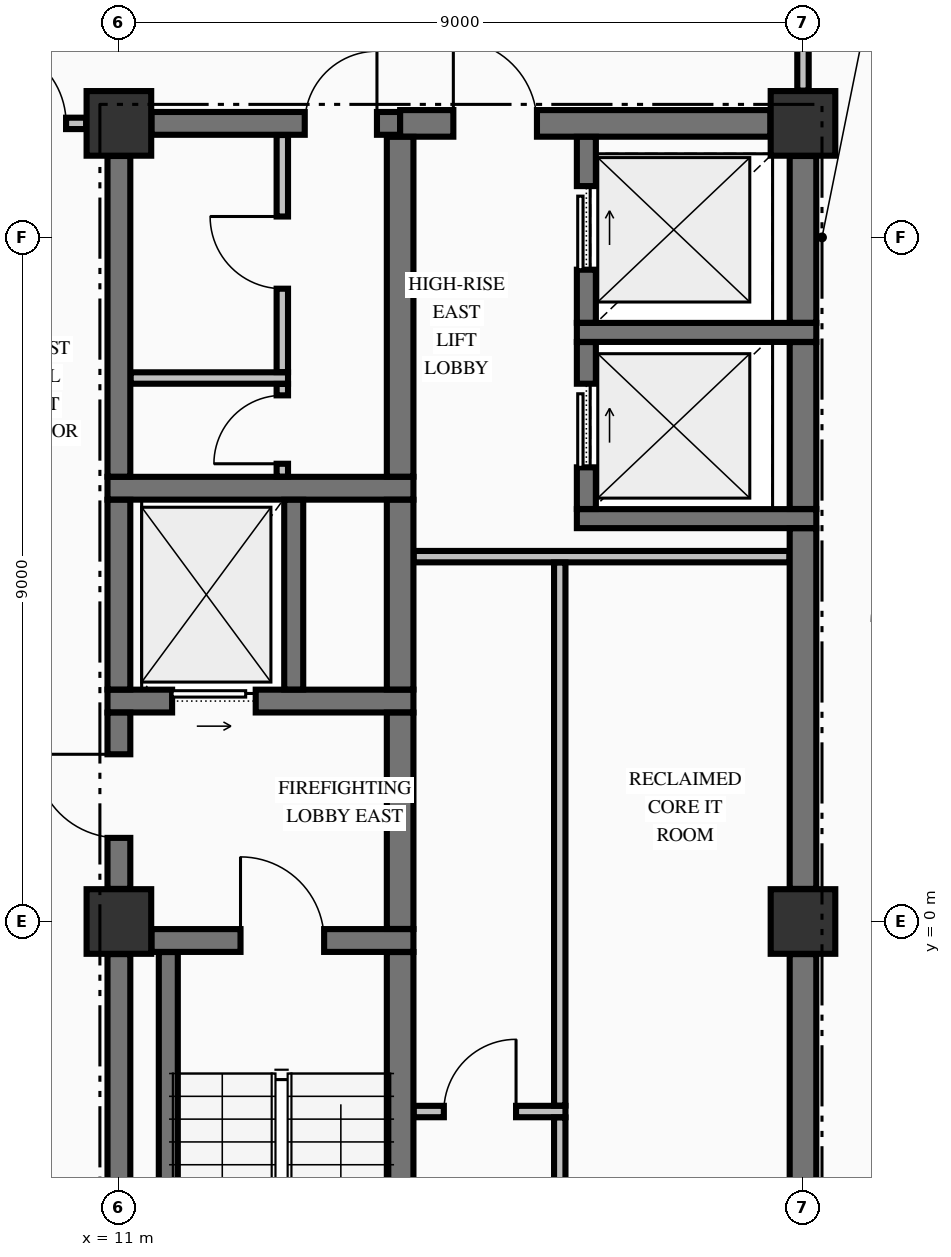
"""IFC4 building model, lengths in metres.
Left out: names, types, materials, properties, quantities, classifications, styles, units other than length and angle.
Written with IfcOpenShell. Run it as: python <this file> out.ifc"""

import sys

from ifc_helpers import new_model, si_unit, direction, frame, frame_2d, origin, origin_2d, place, context, subcontext, project, spatial, rectangle, extrude, element, fill, save


model = new_model("IFC4")
c1 = context("Model", 3, precision=1e-05, world=origin(), true_north=direction((0.0, 1.0)))
c2 = subcontext(c1, "Body", "Model", "MODEL_VIEW")
j1 = project(units=[si_unit("LENGTHUNIT", "METRE"), si_unit("PLANEANGLEUNIT", "RADIAN")], contexts=[c1])
p1 = place(None, origin())
s1 = spatial("IfcSite", under=j1, at=p1, CompositionType="ELEMENT")
p2 = place(p1, origin())
s2 = spatial("IfcBuilding", under=s1, at=p2, CompositionType="ELEMENT")
p3 = place(p2, frame((0.0, 0.0, 191.46)))
s3 = spatial("IfcBuildingStorey", under=s2, at=p3, CompositionType="ELEMENT", Elevation=191.46)
for number, where, z_axis, x_axis in (
    (1, (11.0, 0.0, -0.425), (0.0, 0.0, 1.0), (1.0, 0.0, 0.0)),
    (2, (11.0, 10.5, -0.425), (0.0, 0.0, 1.0), (1.0, 0.0, 0.0)),
    (3, (20.0, 10.5, -0.425), (0.0, 0.0, 1.0), (1.0, 0.0, 0.0)),
    (4, (20.0, 0.0, -0.425), (0.0, 0.0, 1.0), (1.0, 0.0, 0.0)),
):
    element("IfcColumn", number, at=place(p3, frame(where, z_axis=z_axis, x_axis=x_axis)), inside=s3, PredefinedType="COLUMN", context=c2, shape_type="SweptSolid", body=[
        extrude(rectangle(XDim=0.85, YDim=0.85, at=origin_2d()), origin(), (0.0, 0.0, 1.0), 3.55),
    ])
p4 = place(p3, frame((11.429, -0.25, 0.0), z_axis=(0.0, 0.0, 1.0), x_axis=(1.0, 0.0, 0.0)))
e5 = element("IfcWall", 5, at=p4, inside=s3, PredefinedType="SHEAR", context=c2, shape_type="SweptSolid", body=[
    extrude(rectangle(XDim=3.446, YDim=0.3, at=frame_2d((1.723, 0.0))), origin(), (0.0, 0.0, 1.0), 3.125),
])
p5 = place(p4, frame((1.171, 0.0, 0.0)))
e6 = element("IfcOpeningElement", 6, at=p5, cuts=e5, PredefinedType="OPENING", context=c2, shape_type="SweptSolid", body=[
    extrude(rectangle(XDim=1.1, YDim=2.15, at=frame_2d((0.55, 1.075))), frame((0.0, 0.16, 0.0), z_axis=(0.0, -1.0, 0.0), x_axis=(1.0, 0.0, 0.0)), (0.0, 0.0, 1.0), 0.32),
])
p6 = place(p3, frame((10.85, 2.9, 0.0), z_axis=(0.0, 0.0, 1.0), x_axis=(1.0, 0.0, 0.0)))
e7 = element("IfcWall", 7, at=p6, inside=s3, PredefinedType="SHEAR", context=c2, shape_type="SweptSolid", body=[
    extrude(rectangle(XDim=4.025, YDim=0.3, at=frame_2d((2.012, 0.0))), origin(), (0.0, 0.0, 1.0), 3.125),
])
p7 = place(p6, frame((0.85, 0.0, 0.0)))
e8 = element("IfcOpeningElement", 8, at=p7, cuts=e7, PredefinedType="OPENING", context=c2, shape_type="SweptSolid", body=[
    extrude(rectangle(XDim=1.1, YDim=2.2, at=frame_2d((0.55, 1.1))), frame((0.0, 0.16, 0.0), z_axis=(0.0, -1.0, 0.0), x_axis=(1.0, 0.0, 0.0)), (0.0, 0.0, 1.0), 0.32),
])
p8 = place(p3, frame((17.025, 5.3, 0.0), z_axis=(0.0, 0.0, 1.0), x_axis=(1.0, 0.0, 0.0)))
e9 = element("IfcWall", 9, at=p8, inside=s3, PredefinedType="SOLIDWALL", context=c2, shape_type="SweptSolid", body=[
    extrude(rectangle(XDim=3.15, YDim=0.25, at=frame_2d((1.575, 0.0))), origin(), (0.0, 0.0, 1.0), 3.125),
])
p9 = place(p3, frame((10.85, 5.7, 0.0), z_axis=(0.0, 0.0, 1.0), x_axis=(1.0, 0.0, 0.0)))
e10 = element("IfcWall", 10, at=p9, inside=s3, PredefinedType="SHEAR", context=c2, shape_type="SweptSolid", body=[
    extrude(rectangle(XDim=4.025, YDim=0.3, at=frame_2d((2.012, 0.0))), origin(), (0.0, 0.0, 1.0), 3.125),
])
p10 = place(p3, frame((17.025, 7.75, 0.0), z_axis=(0.0, 0.0, 1.0), x_axis=(1.0, 0.0, 0.0)))
e11 = element("IfcWall", 11, at=p10, inside=s3, PredefinedType="SOLIDWALL", context=c2, shape_type="SweptSolid", body=[
    extrude(rectangle(XDim=3.15, YDim=0.25, at=frame_2d((1.575, 0.0))), origin(), (0.0, 0.0, 1.0), 3.125),
])
p11 = place(p3, frame((11.429, 10.5, 0.0), z_axis=(0.0, 0.0, 1.0), x_axis=(1.0, 0.0, 0.0)))
e12 = element("IfcWall", 12, at=p11, inside=s3, PredefinedType="SHEAR", context=c2, shape_type="SweptSolid", body=[
    extrude(rectangle(XDim=3.271, YDim=0.3, at=frame_2d((1.635, 0.0))), origin(), (0.0, 0.0, 1.0), 3.125),
])
p12 = place(p11, frame((2.016, 0.0, 0.0)))
e13 = element("IfcOpeningElement", 13, at=p12, cuts=e12, PredefinedType="OPENING", context=c2, shape_type="SweptSolid", body=[
    extrude(rectangle(XDim=0.95, YDim=2.15, at=frame_2d((0.475, 1.075))), frame((0.0, 0.16, 0.0), z_axis=(0.0, -1.0, 0.0), x_axis=(1.0, 0.0, 0.0)), (0.0, 0.0, 1.0), 0.32),
])
p13 = place(p3, frame((14.7, 10.5, 0.0), z_axis=(0.0, 0.0, 1.0), x_axis=(1.0, 0.0, 0.0)))
e14 = element("IfcWall", 14, at=p13, inside=s3, PredefinedType="SHEAR", context=c2, shape_type="SweptSolid", body=[
    extrude(rectangle(XDim=4.871, YDim=0.35, at=frame_2d((2.436, 0.0))), origin(), (0.0, 0.0, 1.0), 3.125),
])
p14 = place(p13, frame((0.7, 0.0, 0.0)))
e15 = element("IfcOpeningElement", 15, at=p14, cuts=e14, PredefinedType="OPENING", context=c2, shape_type="SweptSolid", body=[
    extrude(rectangle(XDim=1.1, YDim=2.15, at=frame_2d((0.55, 1.075))), frame((0.0, 0.185, 0.0), z_axis=(0.0, -1.0, 0.0), x_axis=(1.0, 0.0, 0.0)), (0.0, 0.0, 1.0), 0.37),
])
p15 = place(p3, frame((14.878, -2.5, 0.0), z_axis=(0.0, 0.0, 1.0), x_axis=(1.0, 0.0, 0.0)))
e16 = element("IfcWall", 16, at=p15, inside=s3, PredefinedType="PARTITIONING", context=c2, shape_type="SweptSolid", body=[
    extrude(rectangle(XDim=1.997, YDim=0.15, at=frame_2d((0.999, 0.0))), origin(), (0.0, 0.0, 1.0), 3.125),
])
p16 = place(p15, frame((0.397, 0.0, 0.0)))
e17 = element("IfcOpeningElement", 17, at=p16, cuts=e16, PredefinedType="OPENING", context=c2, shape_type="SweptSolid", body=[
    extrude(rectangle(XDim=0.95, YDim=2.15, at=frame_2d((0.475, 1.075))), frame((0.0, 0.085, 0.0), z_axis=(0.0, -1.0, 0.0), x_axis=(1.0, 0.0, 0.0)), (0.0, 0.0, 1.0), 0.17),
])
p17 = place(p3, frame((14.878, 4.8, 0.0), z_axis=(0.0, 0.0, 1.0), x_axis=(1.0, 0.0, 0.0)))
e18 = element("IfcWall", 18, at=p17, inside=s3, PredefinedType="PARTITIONING", context=c2, shape_type="SweptSolid", body=[
    extrude(rectangle(XDim=4.944, YDim=0.15, at=frame_2d((2.472, 0.0))), origin(), (0.0, 0.0, 1.0), 3.125),
])
p18 = place(p3, frame((11.153, 7.15, 0.0), z_axis=(0.0, 0.0, 1.0), x_axis=(1.0, 0.0, 0.0)))
e19 = element("IfcWall", 19, at=p18, inside=s3, PredefinedType="PARTITIONING", context=c2, shape_type="SweptSolid", body=[
    extrude(rectangle(XDim=2.072, YDim=0.15, at=frame_2d((1.036, 0.0))), origin(), (0.0, 0.0, 1.0), 3.125),
])
p19 = place(p3, frame((-10.569, 10.5, 0.0), z_axis=(0.0, 0.0, 1.0), x_axis=(1.0, 0.0, 0.0)))
e20 = element("IfcWall", 20, at=p19, inside=s3, PredefinedType="PARTITIONING", context=c2, shape_type="SweptSolid", body=[
    extrude(rectangle(XDim=21.138, YDim=0.15, at=frame_2d((10.569, 0.0))), origin(), (0.0, 0.0, 1.0), 3.125),
])
p20 = place(p19, frame((0.264, 0.0, 0.0)))
e21 = element("IfcOpeningElement", 21, at=p20, cuts=e20, PredefinedType="OPENING", context=c2, shape_type="SweptSolid", body=[
    extrude(rectangle(XDim=1.05, YDim=2.15, at=frame_2d((0.525, 1.075))), frame((0.0, 0.085, 0.0), z_axis=(0.0, -1.0, 0.0), x_axis=(1.0, 0.0, 0.0)), (0.0, 0.0, 1.0), 0.17),
])
p21 = place(p19, frame((19.824, 0.0, 0.0)))
e22 = element("IfcOpeningElement", 22, at=p21, cuts=e20, PredefinedType="OPENING", context=c2, shape_type="SweptSolid", body=[
    extrude(rectangle(XDim=1.05, YDim=2.15, at=frame_2d((0.525, 1.075))), frame((0.0, 0.085, 0.0), z_axis=(0.0, -1.0, 0.0), x_axis=(1.0, 0.0, 0.0)), (0.0, 0.0, 1.0), 0.17),
])
p22 = place(p3, frame((11.0, -9.521, 0.0), z_axis=(0.0, 0.0, 1.0), x_axis=(0.0, 1.0, 0.0)))
e23 = element("IfcWall", 23, at=p22, inside=s3, PredefinedType="SHEAR", context=c2, shape_type="SweptSolid", body=[
    extrude(rectangle(XDim=9.092, YDim=0.3, at=frame_2d((4.546, 0.0))), origin(), (0.0, 0.0, 1.0), 3.125),
])
p23 = place(p3, frame((11.0, 0.429, 0.0), z_axis=(0.0, 0.0, 1.0), x_axis=(0.0, 1.0, 0.0)))
e24 = element("IfcWall", 24, at=p23, inside=s3, PredefinedType="SHEAR", context=c2, shape_type="SweptSolid", body=[
    extrude(rectangle(XDim=2.319, YDim=0.3, at=frame_2d((1.16, 0.0))), origin(), (0.0, 0.0, 1.0), 3.125),
])
p24 = place(p23, frame((0.671, 0.0, 0.0)))
e25 = element("IfcOpeningElement", 25, at=p24, cuts=e24, PredefinedType="OPENING", context=c2, shape_type="SweptSolid", body=[
    extrude(rectangle(XDim=1.1, YDim=2.15, at=frame_2d((0.55, 1.075))), frame((0.0, 0.16, 0.0), z_axis=(0.0, -1.0, 0.0), x_axis=(1.0, 0.0, 0.0)), (0.0, 0.0, 1.0), 0.32),
])
p25 = place(p3, frame((11.0, 3.052, 0.0), z_axis=(0.0, 0.0, 1.0), x_axis=(0.0, 1.0, 0.0)))
e26 = element("IfcWall", 26, at=p25, inside=s3, PredefinedType="SHEAR", context=c2, shape_type="SweptSolid", body=[
    extrude(rectangle(XDim=2.496, YDim=0.3, at=frame_2d((1.248, 0.0))), origin(), (0.0, 0.0, 1.0), 3.125),
])
p26 = place(p3, frame((11.0, 5.852, 0.0), z_axis=(0.0, 0.0, 1.0), x_axis=(0.0, 1.0, 0.0)))
e27 = element("IfcWall", 27, at=p26, inside=s3, PredefinedType="SHEAR", context=c2, shape_type="SweptSolid", body=[
    extrude(rectangle(XDim=4.219, YDim=0.3, at=frame_2d((2.109, 0.0))), origin(), (0.0, 0.0, 1.0), 3.125),
])
p27 = place(p3, frame((11.65, -9.798, 0.0), z_axis=(0.0, 0.0, 1.0), x_axis=(0.0, 1.0, 0.0)))
e28 = element("IfcWall", 28, at=p27, inside=s3, PredefinedType="SOLIDWALL", context=c2, shape_type="SweptSolid", body=[
    extrude(rectangle(XDim=9.396, YDim=0.25, at=frame_2d((4.698, 0.0))), origin(), (0.0, 0.0, 1.0), 3.125),
])
p28 = place(p3, frame((13.3, 3.052, 0.0), z_axis=(0.0, 0.0, 1.0), x_axis=(0.0, 1.0, 0.0)))
e29 = element("IfcWall", 29, at=p28, inside=s3, PredefinedType="SOLIDWALL", context=c2, shape_type="SweptSolid", body=[
    extrude(rectangle(XDim=2.496, YDim=0.25, at=frame_2d((1.248, 0.0))), origin(), (0.0, 0.0, 1.0), 3.125),
])
p29 = place(p3, frame((14.7, -9.773, 0.0), z_axis=(0.0, 0.0, 1.0), x_axis=(0.0, 1.0, 0.0)))
e30 = element("IfcWall", 30, at=p29, inside=s3, PredefinedType="SHEAR", context=c2, shape_type="SweptSolid", body=[
    extrude(rectangle(XDim=9.371, YDim=0.35, at=frame_2d((4.686, 0.0))), origin(), (0.0, 0.0, 1.0), 3.125),
])
p30 = place(p3, frame((14.7, -0.098, 0.0), z_axis=(0.0, 0.0, 1.0), x_axis=(0.0, 1.0, 0.0)))
e31 = element("IfcWall", 31, at=p30, inside=s3, PredefinedType="SHEAR", context=c2, shape_type="SweptSolid", body=[
    extrude(rectangle(XDim=2.846, YDim=0.35, at=frame_2d((1.423, 0.0))), origin(), (0.0, 0.0, 1.0), 3.125),
])
p31 = place(p3, frame((14.7, 3.052, 0.0), z_axis=(0.0, 0.0, 1.0), x_axis=(0.0, 1.0, 0.0)))
e32 = element("IfcWall", 32, at=p31, inside=s3, PredefinedType="SHEAR", context=c2, shape_type="SweptSolid", body=[
    extrude(rectangle(XDim=2.496, YDim=0.35, at=frame_2d((1.248, 0.0))), origin(), (0.0, 0.0, 1.0), 3.125),
])
p32 = place(p3, frame((14.7, 5.852, 0.0), z_axis=(0.0, 0.0, 1.0), x_axis=(0.0, 1.0, 0.0)))
e33 = element("IfcWall", 33, at=p32, inside=s3, PredefinedType="SHEAR", context=c2, shape_type="SweptSolid", body=[
    extrude(rectangle(XDim=4.471, YDim=0.35, at=frame_2d((2.235, 0.0))), origin(), (0.0, 0.0, 1.0), 3.125),
])
p33 = place(p3, frame((17.15, 5.427, 0.0), z_axis=(0.0, 0.0, 1.0), x_axis=(0.0, 1.0, 0.0)))
e34 = element("IfcWall", 34, at=p33, inside=s3, PredefinedType="SOLIDWALL", context=c2, shape_type="SweptSolid", body=[
    extrude(rectangle(XDim=2.196, YDim=0.25, at=frame_2d((1.098, 0.0))), origin(), (0.0, 0.0, 1.0), 3.125),
])
p34 = place(p33, frame((0.548, 0.0, 0.0)))
e35 = element("IfcOpeningElement", 35, at=p34, cuts=e34, PredefinedType="OPENING", context=c2, shape_type="SweptSolid", body=[
    extrude(rectangle(XDim=1.1, YDim=2.2, at=frame_2d((0.55, 1.1))), frame((0.0, 0.135, 0.0), z_axis=(0.0, -1.0, 0.0), x_axis=(1.0, 0.0, 0.0)), (0.0, 0.0, 1.0), 0.27),
])
p35 = place(p3, frame((17.15, 7.877, 0.0), z_axis=(0.0, 0.0, 1.0), x_axis=(0.0, 1.0, 0.0)))
e36 = element("IfcWall", 36, at=p35, inside=s3, PredefinedType="SOLIDWALL", context=c2, shape_type="SweptSolid", body=[
    extrude(rectangle(XDim=2.446, YDim=0.25, at=frame_2d((1.223, 0.0))), origin(), (0.0, 0.0, 1.0), 3.125),
])
p36 = place(p35, frame((0.698, 0.0, 0.0)))
e37 = element("IfcOpeningElement", 37, at=p36, cuts=e36, PredefinedType="OPENING", context=c2, shape_type="SweptSolid", body=[
    extrude(rectangle(XDim=1.1, YDim=2.2, at=frame_2d((0.55, 1.1))), frame((0.0, 0.135, 0.0), z_axis=(0.0, -1.0, 0.0), x_axis=(1.0, 0.0, 0.0)), (0.0, 0.0, 1.0), 0.27),
])
p37 = place(p3, frame((20.0, -9.521, 0.0), z_axis=(0.0, 0.0, 1.0), x_axis=(0.0, 1.0, 0.0)))
e38 = element("IfcWall", 38, at=p37, inside=s3, PredefinedType="SHEAR", context=c2, shape_type="SweptSolid", body=[
    extrude(rectangle(XDim=9.092, YDim=0.35, at=frame_2d((4.546, 0.0))), origin(), (0.0, 0.0, 1.0), 3.125),
])
p38 = place(p3, frame((20.0, 0.429, 0.0), z_axis=(0.0, 0.0, 1.0), x_axis=(0.0, 1.0, 0.0)))
e39 = element("IfcWall", 39, at=p38, inside=s3, PredefinedType="SHEAR", context=c2, shape_type="SweptSolid", body=[
    extrude(rectangle(XDim=4.744, YDim=0.35, at=frame_2d((2.372, 0.0))), origin(), (0.0, 0.0, 1.0), 3.125),
])
p39 = place(p3, frame((20.0, 5.427, 0.0), z_axis=(0.0, 0.0, 1.0), x_axis=(0.0, 1.0, 0.0)))
e40 = element("IfcWall", 40, at=p39, inside=s3, PredefinedType="SHEAR", context=c2, shape_type="SweptSolid", body=[
    extrude(rectangle(XDim=2.196, YDim=0.35, at=frame_2d((1.098, 0.0))), origin(), (0.0, 0.0, 1.0), 3.125),
])
p40 = place(p3, frame((20.0, 7.877, 0.0), z_axis=(0.0, 0.0, 1.0), x_axis=(0.0, 1.0, 0.0)))
e41 = element("IfcWall", 41, at=p40, inside=s3, PredefinedType="SHEAR", context=c2, shape_type="SweptSolid", body=[
    extrude(rectangle(XDim=2.194, YDim=0.35, at=frame_2d((1.097, 0.0))), origin(), (0.0, 0.0, 1.0), 3.125),
])
p41 = place(p3, frame((13.15, 5.853, 0.0), z_axis=(0.0, 0.0, 1.0), x_axis=(0.0, 1.0, 0.0)))
e42 = element("IfcWall", 42, at=p41, inside=s3, PredefinedType="PARTITIONING", context=c2, shape_type="SweptSolid", body=[
    extrude(rectangle(XDim=1.219, YDim=0.15, at=frame_2d((0.609, 0.0))), origin(), (0.0, 0.0, 1.0), 3.125),
])
p42 = place(p41, frame((0.169, 0.0, 0.0)))
e43 = element("IfcOpeningElement", 43, at=p42, cuts=e42, PredefinedType="OPENING", context=c2, shape_type="SweptSolid", body=[
    extrude(rectangle(XDim=0.9, YDim=2.15, at=frame_2d((0.45, 1.075))), frame((0.0, 0.085, 0.0), z_axis=(0.0, -1.0, 0.0), x_axis=(1.0, 0.0, 0.0)), (0.0, 0.0, 1.0), 0.17),
])
p43 = place(p3, frame((13.15, 7.228, 0.0), z_axis=(0.0, 0.0, 1.0), x_axis=(0.0, 1.0, 0.0)))
e44 = element("IfcWall", 44, at=p43, inside=s3, PredefinedType="PARTITIONING", context=c2, shape_type="SweptSolid", body=[
    extrude(rectangle(XDim=3.119, YDim=0.15, at=frame_2d((1.56, 0.0))), origin(), (0.0, 0.0, 1.0), 3.125),
])
p44 = place(p43, frame((1.097, 0.0, 0.0)))
e45 = element("IfcOpeningElement", 45, at=p44, cuts=e44, PredefinedType="OPENING", context=c2, shape_type="SweptSolid", body=[
    extrude(rectangle(XDim=0.95, YDim=2.15, at=frame_2d((0.475, 1.075))), frame((0.0, 0.085, 0.0), z_axis=(0.0, -1.0, 0.0), x_axis=(1.0, 0.0, 0.0)), (0.0, 0.0, 1.0), 0.17),
])
p45 = place(p3, frame((16.8, -9.772, 0.0), z_axis=(0.0, 0.0, 1.0), x_axis=(0.0, 1.0, 0.0)))
e46 = element("IfcWall", 46, at=p45, inside=s3, PredefinedType="PARTITIONING", context=c2, shape_type="SweptSolid", body=[
    extrude(rectangle(XDim=7.194, YDim=0.15, at=frame_2d((3.597, 0.0))), origin(), (0.0, 0.0, 1.0), 3.125),
])
p46 = place(p3, frame((16.8, -2.422, 0.0), z_axis=(0.0, 0.0, 1.0), x_axis=(0.0, 1.0, 0.0)))
e47 = element("IfcWall", 47, at=p46, inside=s3, PredefinedType="PARTITIONING", context=c2, shape_type="SweptSolid", body=[
    extrude(rectangle(XDim=7.144, YDim=0.15, at=frame_2d((3.572, 0.0))), origin(), (0.0, 0.0, 1.0), 3.125),
])
p47 = place(p3, frame((20.0, 10.931, 0.0), z_axis=(0.0, 0.0, 1.0), x_axis=(0.0, 1.0, 0.0)))
e48 = element("IfcWall", 48, at=p47, inside=s3, PredefinedType="PARTITIONING", context=c2, shape_type="SweptSolid", body=[
    extrude(rectangle(XDim=2.791, YDim=0.15, at=frame_2d((1.396, 0.0))), origin(), (0.0, 0.0, 1.0), 2.317),
])
p48 = place(p5, origin())
e49 = element("IfcDoor", 49, at=p48, inside=s3, OperationType="SINGLE_SWING_LEFT", PredefinedType="DOOR", context=c2, shape_type="SweptSolid", body=[
    extrude(rectangle(XDim=1.1, YDim=2.15, at=frame_2d((0.55, 1.075))), frame((0.0, 0.025, 0.0), z_axis=(0.0, -1.0, 0.0), x_axis=(1.0, 0.0, 0.0)), (0.0, 0.0, 1.0), 0.05),
])
fill(e6, e49)
p49 = place(p24, origin())
e50 = element("IfcDoor", 50, at=p49, inside=s3, OperationType="SINGLE_SWING_RIGHT", PredefinedType="DOOR", context=c2, shape_type="SweptSolid", body=[
    extrude(rectangle(XDim=1.1, YDim=2.15, at=frame_2d((0.55, 1.075))), frame((0.0, 0.025, 0.0), z_axis=(0.0, -1.0, 0.0), x_axis=(1.0, 0.0, 0.0)), (0.0, 0.0, 1.0), 0.05),
])
fill(e25, e50)
p50 = place(p7, origin())
e51 = element("IfcDoor", 51, at=p50, inside=s3, OperationType="SLIDING_TO_RIGHT", PredefinedType="DOOR", context=c2, shape_type="SweptSolid", body=[
    extrude(rectangle(XDim=1.1, YDim=2.2, at=frame_2d((0.55, 1.1))), frame((0.0, 0.025, 0.0), z_axis=(0.0, -1.0, 0.0), x_axis=(1.0, 0.0, 0.0)), (0.0, 0.0, 1.0), 0.05),
])
fill(e8, e51)
p51 = place(p12, origin())
e52 = element("IfcDoor", 52, at=p51, inside=s3, OperationType="SINGLE_SWING_RIGHT", PredefinedType="DOOR", context=c2, shape_type="SweptSolid", body=[
    extrude(rectangle(XDim=0.95, YDim=2.15, at=frame_2d((0.475, 1.075))), frame((0.0, 0.025, 0.0), z_axis=(0.0, -1.0, 0.0), x_axis=(1.0, 0.0, 0.0)), (0.0, 0.0, 1.0), 0.05),
])
fill(e13, e52)
p52 = place(p42, origin())
e53 = element("IfcDoor", 53, at=p52, inside=s3, OperationType="SINGLE_SWING_LEFT", PredefinedType="DOOR", context=c2, shape_type="SweptSolid", body=[
    extrude(rectangle(XDim=0.9, YDim=2.15, at=frame_2d((0.45, 1.075))), frame((0.0, 0.025, 0.0), z_axis=(0.0, -1.0, 0.0), x_axis=(1.0, 0.0, 0.0)), (0.0, 0.0, 1.0), 0.05),
])
fill(e43, e53)
p53 = place(p44, origin())
e54 = element("IfcDoor", 54, at=p53, inside=s3, OperationType="SINGLE_SWING_RIGHT", PredefinedType="DOOR", context=c2, shape_type="SweptSolid", body=[
    extrude(rectangle(XDim=0.95, YDim=2.15, at=frame_2d((0.475, 1.075))), frame((0.0, 0.025, 0.0), z_axis=(0.0, -1.0, 0.0), x_axis=(1.0, 0.0, 0.0)), (0.0, 0.0, 1.0), 0.05),
])
fill(e45, e54)
p54 = place(p34, origin())
e55 = element("IfcDoor", 55, at=p54, inside=s3, OperationType="SLIDING_TO_RIGHT", PredefinedType="DOOR", context=c2, shape_type="SweptSolid", body=[
    extrude(rectangle(XDim=1.1, YDim=2.2, at=frame_2d((0.55, 1.1))), frame((0.0, 0.025, 0.0), z_axis=(0.0, -1.0, 0.0), x_axis=(1.0, 0.0, 0.0)), (0.0, 0.0, 1.0), 0.05),
])
fill(e35, e55)
p55 = place(p36, origin())
e56 = element("IfcDoor", 56, at=p55, inside=s3, OperationType="SLIDING_TO_RIGHT", PredefinedType="DOOR", context=c2, shape_type="SweptSolid", body=[
    extrude(rectangle(XDim=1.1, YDim=2.2, at=frame_2d((0.55, 1.1))), frame((0.0, 0.025, 0.0), z_axis=(0.0, -1.0, 0.0), x_axis=(1.0, 0.0, 0.0)), (0.0, 0.0, 1.0), 0.05),
])
fill(e37, e56)
p56 = place(p14, origin())
e57 = element("IfcDoor", 57, at=p56, inside=s3, OperationType="SINGLE_SWING_LEFT", PredefinedType="DOOR", context=c2, shape_type="SweptSolid", body=[
    extrude(rectangle(XDim=1.1, YDim=2.15, at=frame_2d((0.55, 1.075))), frame((0.0, 0.025, 0.0), z_axis=(0.0, -1.0, 0.0), x_axis=(1.0, 0.0, 0.0)), (0.0, 0.0, 1.0), 0.05),
])
fill(e15, e57)
p57 = place(p16, origin())
e58 = element("IfcDoor", 58, at=p57, inside=s3, OperationType="SINGLE_SWING_RIGHT", PredefinedType="DOOR", context=c2, shape_type="SweptSolid", body=[
    extrude(rectangle(XDim=0.95, YDim=2.15, at=frame_2d((0.475, 1.075))), frame((0.0, 0.025, 0.0), z_axis=(0.0, -1.0, 0.0), x_axis=(1.0, 0.0, 0.0)), (0.0, 0.0, 1.0), 0.05),
])
fill(e17, e58)
p58 = place(p21, origin())
e59 = element("IfcDoor", 59, at=p58, inside=s3, OperationType="SINGLE_SWING_LEFT", PredefinedType="DOOR", context=c2, shape_type="SweptSolid", body=[
    extrude(rectangle(XDim=1.05, YDim=2.15, at=frame_2d((0.525, 1.075))), frame((0.0, 0.025, 0.0), z_axis=(0.0, -1.0, 0.0), x_axis=(1.0, 0.0, 0.0)), (0.0, 0.0, 1.0), 0.05),
])
fill(e22, e59)
save(model, sys.argv[1])
